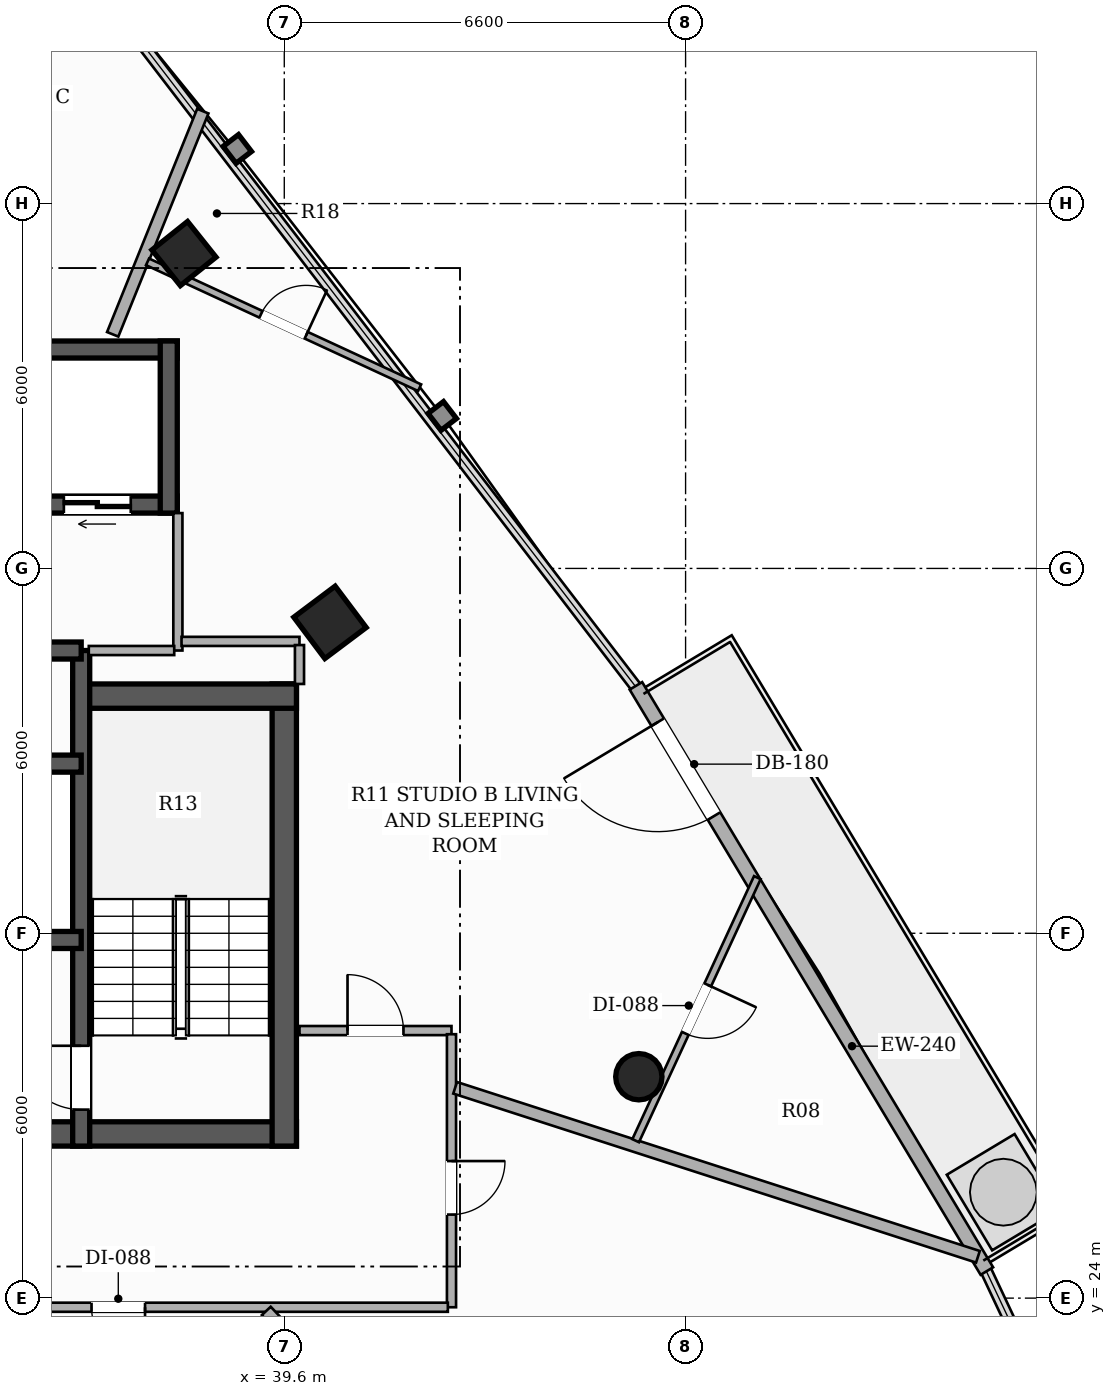
"""IFC4 building model, lengths in metres.
Left out: names, types, materials, properties, quantities, classifications, styles, units other than length and angle.
Written with IfcOpenShell. Run it as: python <this file> out.ifc"""

import sys

from ifc_helpers import new_model, si_unit, direction, frame, frame_2d, origin, origin_2d, place, context, subcontext, project, spatial, rectangle, hollow_rectangle, hollow_circle, extrude, element, fill, save


model = new_model("IFC4")
c1 = context("Model", 3, precision=1e-05, world=origin(), true_north=direction((0.0, 1.0)))
c2 = subcontext(c1, "Body", "Model", "MODEL_VIEW")
j1 = project(units=[si_unit("LENGTHUNIT", "METRE"), si_unit("PLANEANGLEUNIT", "RADIAN")], contexts=[c1])
p1 = place(None, origin())
s1 = spatial("IfcSite", under=j1, at=p1, CompositionType="ELEMENT")
p2 = place(p1, origin())
s2 = spatial("IfcBuilding", under=s1, at=p2, CompositionType="ELEMENT")
p3 = place(p2, frame((0.0, 0.0, 150.65)))
s3 = spatial("IfcBuildingStorey", under=s2, at=p3, CompositionType="ELEMENT", Elevation=150.65)
p4 = place(p3, frame((26.2, 26.7, 0.0), z_axis=(0.0, 0.0, 1.0), x_axis=(1.0, 0.0, 0.0)))
e1 = element("IfcWall", 1, at=p4, inside=s3, PredefinedType="SHEAR", context=c2, shape_type="SweptSolid", body=[
    extrude(rectangle(XDim=13.6, YDim=0.4, at=frame_2d((6.8, 0.0))), origin(), (0.0, 0.0, 1.0), 3.3),
])
p5 = place(p4, frame((4.35, 0.0, 0.0)))
e2 = element("IfcOpeningElement", 2, at=p5, cuts=e1, PredefinedType="OPENING", context=c2, shape_type="SweptSolid", body=[
    extrude(rectangle(XDim=1.05, YDim=2.15, at=frame_2d((0.525, 1.075))), frame((0.0, 0.21, 0.0), z_axis=(0.0, -1.0, 0.0), x_axis=(1.0, 0.0, 0.0)), (0.0, 0.0, 1.0), 0.42),
])
p6 = place(p4, frame((8.3, 0.0, 0.0)))
e3 = element("IfcOpeningElement", 3, at=p6, cuts=e1, PredefinedType="OPENING", context=c2, shape_type="SweptSolid", body=[
    extrude(rectangle(XDim=1.05, YDim=2.15, at=frame_2d((0.525, 1.075))), frame((0.0, 0.21, 0.0), z_axis=(0.0, -1.0, 0.0), x_axis=(1.0, 0.0, 0.0)), (0.0, 0.0, 1.0), 0.42),
])
p7 = place(p3, frame((39.6, 26.5, 0.0), z_axis=(0.0, 0.0, 1.0), x_axis=(0.0, 1.0, 0.0)))
e4 = element("IfcWall", 4, at=p7, inside=s3, PredefinedType="SHEAR", context=c2, shape_type="SweptSolid", body=[
    extrude(rectangle(XDim=7.6, YDim=0.4, at=frame_2d((3.8, 0.0))), origin(), (0.0, 0.0, 1.0), 3.3),
])
p8 = place(p3, frame((36.12, 33.9, 0.0), z_axis=(0.0, 0.0, 1.0), x_axis=(1.0, 0.0, 0.0)))
e5 = element("IfcWall", 5, at=p8, inside=s3, PredefinedType="SHEAR", context=c2, shape_type="SweptSolid", body=[
    extrude(rectangle(XDim=3.68, YDim=0.4, at=frame_2d((1.84, 0.0))), origin(), (0.0, 0.0, 1.0), 3.3),
])
p9 = place(p3, frame((36.26, 26.5, 0.0), z_axis=(0.0, 0.0, 1.0), x_axis=(0.0, 1.0, 0.0)))
e6 = element("IfcWall", 6, at=p9, inside=s3, PredefinedType="SHEAR", context=c2, shape_type="SweptSolid", body=[
    extrude(rectangle(XDim=8.15, YDim=0.28, at=frame_2d((4.075, 0.0))), origin(), (0.0, 0.0, 1.0), 3.3),
])
p10 = place(p9, frame((0.6, 0.0, 0.0)))
e7 = element("IfcOpeningElement", 7, at=p10, cuts=e6, PredefinedType="OPENING", context=c2, shape_type="SweptSolid", body=[
    extrude(rectangle(XDim=1.05, YDim=2.15, at=frame_2d((0.525, 1.075))), frame((0.0, 0.15, 0.0), z_axis=(0.0, -1.0, 0.0), x_axis=(1.0, 0.0, 0.0)), (0.0, 0.0, 1.0), 0.3),
])
p11 = place(p3, frame((36.26, 29.89, 0.0), z_axis=(0.0, 0.0, 1.0), x_axis=(-1.0, 0.0, 0.0)))
e8 = element("IfcWall", 8, at=p11, inside=s3, PredefinedType="SHEAR", context=c2, shape_type="SweptSolid", body=[
    extrude(rectangle(XDim=6.52, YDim=0.28, at=frame_2d((3.26, 0.0))), origin(), (0.0, 0.0, 1.0), 3.3),
])
p12 = place(p11, frame((4.875, 0.0, 0.0)))
e9 = element("IfcOpeningElement", 9, at=p12, cuts=e8, PredefinedType="OPENING", context=c2, shape_type="SweptSolid", body=[
    extrude(rectangle(XDim=1.1, YDim=2.2, at=frame_2d((0.55, 1.1))), frame((0.0, 0.15, 0.0), z_axis=(0.0, -1.0, 0.0), x_axis=(1.0, 0.0, 0.0)), (0.0, 0.0, 1.0), 0.3),
])
p13 = place(p11, frame((2.875, 0.0, 0.0)))
e10 = element("IfcOpeningElement", 10, at=p13, cuts=e8, PredefinedType="OPENING", context=c2, shape_type="SweptSolid", body=[
    extrude(rectangle(XDim=1.1, YDim=2.2, at=frame_2d((0.55, 1.1))), frame((0.0, 0.15, 0.0), z_axis=(0.0, -1.0, 0.0), x_axis=(1.0, 0.0, 0.0)), (0.0, 0.0, 1.0), 0.3),
])
p14 = place(p11, frame((0.6, 0.0, 0.0)))
e11 = element("IfcOpeningElement", 11, at=p14, cuts=e8, PredefinedType="OPENING", context=c2, shape_type="SweptSolid", body=[
    extrude(rectangle(XDim=1.3, YDim=2.2, at=frame_2d((0.65, 1.1))), frame((0.0, 0.15, 0.0), z_axis=(0.0, -1.0, 0.0), x_axis=(1.0, 0.0, 0.0)), (0.0, 0.0, 1.0), 0.3),
])
p15 = place(p3, frame((29.74, 32.79, 0.0), z_axis=(0.0, 0.0, 1.0), x_axis=(1.0, 0.0, 0.0)))
e12 = element("IfcWall", 12, at=p15, inside=s3, PredefinedType="SHEAR", context=c2, shape_type="SweptSolid", body=[
    extrude(rectangle(XDim=6.52, YDim=0.28, at=frame_2d((3.26, 0.0))), origin(), (0.0, 0.0, 1.0), 3.3),
])
p16 = place(p3, frame((29.74, 34.65, 0.0), z_axis=(0.0, 0.0, 1.0), x_axis=(1.0, 0.0, 0.0)))
e13 = element("IfcWall", 13, at=p16, inside=s3, PredefinedType="SHEAR", context=c2, shape_type="SweptSolid", body=[
    extrude(rectangle(XDim=6.52, YDim=0.28, at=frame_2d((3.26, 0.0))), origin(), (0.0, 0.0, 1.0), 3.3),
])
p17 = place(p16, frame((0.765, 0.0, 0.0)))
e14 = element("IfcOpeningElement", 14, at=p17, cuts=e13, PredefinedType="OPENING", context=c2, shape_type="SweptSolid", body=[
    extrude(rectangle(XDim=0.82, YDim=2.1, at=frame_2d((0.41, 1.05))), frame((0.0, 0.15, 0.0), z_axis=(0.0, -1.0, 0.0), x_axis=(1.0, 0.0, 0.0)), (0.0, 0.0, 1.0), 0.3),
])
p18 = place(p16, frame((2.84, 0.0, 0.0)))
e15 = element("IfcOpeningElement", 15, at=p18, cuts=e13, PredefinedType="OPENING", context=c2, shape_type="SweptSolid", body=[
    extrude(rectangle(XDim=0.82, YDim=2.1, at=frame_2d((0.41, 1.05))), frame((0.0, 0.15, 0.0), z_axis=(0.0, -1.0, 0.0), x_axis=(1.0, 0.0, 0.0)), (0.0, 0.0, 1.0), 0.3),
])
p19 = place(p16, frame((4.915, 0.0, 0.0)))
e16 = element("IfcOpeningElement", 16, at=p19, cuts=e13, PredefinedType="OPENING", context=c2, shape_type="SweptSolid", body=[
    extrude(rectangle(XDim=0.82, YDim=2.1, at=frame_2d((0.41, 1.05))), frame((0.0, 0.15, 0.0), z_axis=(0.0, -1.0, 0.0), x_axis=(1.0, 0.0, 0.0)), (0.0, 0.0, 1.0), 0.3),
])
p20 = place(p3, frame((37.84, 37.05, 0.0), z_axis=(0.0, 0.0, 1.0), x_axis=(-1.0, 0.0, 0.0)))
e17 = element("IfcWall", 17, at=p20, inside=s3, PredefinedType="SHEAR", context=c2, shape_type="SweptSolid", body=[
    extrude(rectangle(XDim=9.68, YDim=0.28, at=frame_2d((4.84, 0.0))), origin(), (0.0, 0.0, 1.0), 3.3),
])
p21 = place(p20, frame((7.815, 0.0, 0.0)))
e18 = element("IfcOpeningElement", 18, at=p21, cuts=e17, PredefinedType="OPENING", context=c2, shape_type="SweptSolid", body=[
    extrude(rectangle(XDim=1.1, YDim=2.2, at=frame_2d((0.55, 1.1))), frame((0.0, 0.15, 0.0), z_axis=(0.0, -1.0, 0.0), x_axis=(1.0, 0.0, 0.0)), (0.0, 0.0, 1.0), 0.3),
])
p22 = place(p20, frame((0.765, 0.0, 0.0)))
e19 = element("IfcOpeningElement", 19, at=p22, cuts=e17, PredefinedType="OPENING", context=c2, shape_type="SweptSolid", body=[
    extrude(rectangle(XDim=1.1, YDim=2.2, at=frame_2d((0.55, 1.1))), frame((0.0, 0.15, 0.0), z_axis=(0.0, -1.0, 0.0), x_axis=(1.0, 0.0, 0.0)), (0.0, 0.0, 1.0), 0.3),
])
p23 = place(p3, frame((28.16, 39.6, 0.0), z_axis=(0.0, 0.0, 1.0), x_axis=(1.0, 0.0, 0.0)))
e20 = element("IfcWall", 20, at=p23, inside=s3, PredefinedType="SHEAR", context=c2, shape_type="SweptSolid", body=[
    extrude(rectangle(XDim=9.68, YDim=0.28, at=frame_2d((4.84, 0.0))), origin(), (0.0, 0.0, 1.0), 3.3),
])
p24 = place(p3, frame((37.7, 36.91, 0.0), z_axis=(0.0, 0.0, 1.0), x_axis=(0.0, 1.0, 0.0)))
e21 = element("IfcWall", 21, at=p24, inside=s3, PredefinedType="SHEAR", context=c2, shape_type="SweptSolid", body=[
    extrude(rectangle(XDim=2.83, YDim=0.28, at=frame_2d((1.415, 0.0))), origin(), (0.0, 0.0, 1.0), 3.3),
])
p25 = place(p3, frame((45.431, 27.641, 0.0), z_axis=(0.0, 0.0, 1.0), x_axis=(1.0, 0.0, 0.0)))
e22 = element("IfcColumn", 22, at=p25, inside=s3, PredefinedType="COLUMN", context=c2, shape_type="SweptSolid", body=[
    extrude(hollow_circle(Radius=0.381, WallThickness=0.022, at=origin_2d()), origin(), (0.0, 0.0, 1.0), 3.3),
])
p26 = place(p3, frame((40.352, 35.113, 0.0), z_axis=(0.0, 0.0, 1.0), x_axis=(-0.600420225326, 0.799684658487, 0.0)))
e23 = element("IfcColumn", 23, at=p26, inside=s3, PredefinedType="COLUMN", context=c2, shape_type="SweptSolid", body=[
    extrude(hollow_rectangle(XDim=0.85, YDim=0.85, WallThickness=0.028, at=origin_2d()), origin(), (0.0, 0.0, 1.0), 3.3),
])
p27 = place(p3, frame((37.95, 41.178, 0.0), z_axis=(0.0, 0.0, 1.0), x_axis=(-0.623879596709, 0.781520472419, 0.0)))
e24 = element("IfcColumn", 24, at=p27, inside=s3, PredefinedType="COLUMN", context=c2, shape_type="SweptSolid", body=[
    extrude(hollow_rectangle(XDim=0.75, YDim=0.75, WallThickness=0.025, at=origin_2d()), origin(), (0.0, 0.0, 1.0), 3.3),
])
p28 = place(p3, frame((51.155, 24.445, 0.0), z_axis=(0.0, 0.0, 1.0), x_axis=(-0.514335781973, 0.857588889493, 0.0)))
e25 = element("IfcWall", 25, at=p28, inside=s3, PredefinedType="SOLIDWALL", context=c2, shape_type="SweptSolid", body=[
    extrude(rectangle(XDim=11.222, YDim=0.24, at=frame_2d((5.611, 0.0))), origin(), (0.0, 0.0, 1.0), 2.624),
])
p29 = place(p28, frame((8.725, 0.0, 0.0)))
e26 = element("IfcOpeningElement", 26, at=p29, cuts=e25, PredefinedType="OPENING", context=c2, shape_type="SweptSolid", body=[
    extrude(rectangle(XDim=1.8, YDim=2.2, at=frame_2d((0.9, 1.1))), frame((0.0, 0.13, 0.0), z_axis=(0.0, -1.0, 0.0), x_axis=(1.0, 0.0, 0.0)), (0.0, 0.0, 1.0), 0.26),
])
p30 = place(p3, frame((37.85, 34.65, 0.0), z_axis=(0.0, 0.0, 1.0), x_axis=(0.0, 1.0, 0.0)))
e27 = element("IfcWall", 27, at=p30, inside=s3, PredefinedType="PARTITIONING", context=c2, shape_type="SweptSolid", body=[
    extrude(rectangle(XDim=2.26, YDim=0.15, at=frame_2d((1.13, 0.0))), origin(), (0.0, 0.0, 1.0), 3.06),
])
p31 = place(p3, frame((36.385, 34.65, 0.0), z_axis=(0.0, 0.0, 1.0), x_axis=(1.0, 0.0, 0.0)))
e28 = element("IfcWall", 28, at=p31, inside=s3, PredefinedType="PARTITIONING", context=c2, shape_type="SweptSolid", body=[
    extrude(rectangle(XDim=1.405, YDim=0.15, at=frame_2d((0.703, 0.0))), origin(), (0.0, 0.0, 1.0), 2.425),
])
p32 = place(p3, frame((39.85, 28.4, 0.0), z_axis=(0.0, 0.0, 1.0), x_axis=(1.0, 0.0, 0.0)))
e29 = element("IfcWall", 29, at=p32, inside=s3, PredefinedType="PARTITIONING", context=c2, shape_type="SweptSolid", body=[
    extrude(rectangle(XDim=2.5, YDim=0.15, at=frame_2d((1.25, 0.0))), origin(), (0.0, 0.0, 1.0), 2.721),
])
p33 = place(p32, frame((0.79, 0.0, 0.0)))
e30 = element("IfcOpeningElement", 30, at=p33, cuts=e29, PredefinedType="OPENING", context=c2, shape_type="SweptSolid", body=[
    extrude(rectangle(XDim=0.92, YDim=2.15, at=frame_2d((0.46, 1.075))), frame((0.0, 0.085, 0.0), z_axis=(0.0, -1.0, 0.0), x_axis=(1.0, 0.0, 0.0)), (0.0, 0.0, 1.0), 0.17),
])
p34 = place(p3, frame((42.35, 28.34, 0.0), z_axis=(0.0, 0.0, 1.0), x_axis=(0.0, -1.0, 0.0)))
e31 = element("IfcWall", 31, at=p34, inside=s3, PredefinedType="PARTITIONING", context=c2, shape_type="SweptSolid", body=[
    extrude(rectangle(XDim=4.49, YDim=0.15, at=frame_2d((2.245, 0.0))), origin(), (0.0, 0.0, 1.0), 2.721),
])
p35 = place(p34, frame((2.086, 0.0, 0.0)))
e32 = element("IfcOpeningElement", 32, at=p35, cuts=e31, PredefinedType="OPENING", context=c2, shape_type="SweptSolid", body=[
    extrude(rectangle(XDim=0.88, YDim=2.1, at=frame_2d((0.44, 1.05))), frame((0.0, 0.085, 0.0), z_axis=(0.0, -1.0, 0.0), x_axis=(1.0, 0.0, 0.0)), (0.0, 0.0, 1.0), 0.17),
])
p36 = place(p3, frame((42.29, 23.85, 0.0), z_axis=(0.0, 0.0, 1.0), x_axis=(-1.0, 0.0, 0.0)))
e33 = element("IfcWall", 33, at=p36, inside=s3, PredefinedType="PARTITIONING", context=c2, shape_type="SweptSolid", body=[
    extrude(rectangle(XDim=8.179, YDim=0.15, at=frame_2d((4.089, 0.0))), origin(), (0.0, 0.0, 1.0), 2.492),
])
p37 = place(p36, frame((4.98, 0.0, 0.0)))
e34 = element("IfcOpeningElement", 34, at=p37, cuts=e33, PredefinedType="OPENING", context=c2, shape_type="SweptSolid", body=[
    extrude(rectangle(XDim=0.88, YDim=2.1, at=frame_2d((0.44, 1.05))), frame((0.0, 0.085, 0.0), z_axis=(0.0, -1.0, 0.0), x_axis=(1.0, 0.0, 0.0)), (0.0, 0.0, 1.0), 0.17),
])
p38 = place(p3, frame((37.91, 34.8, 0.0), z_axis=(0.0, 0.0, 1.0), x_axis=(1.0, 0.0, 0.0)))
e35 = element("IfcWall", 35, at=p38, inside=s3, PredefinedType="PARTITIONING", context=c2, shape_type="SweptSolid", body=[
    extrude(rectangle(XDim=1.94, YDim=0.15, at=frame_2d((0.97, 0.0))), origin(), (0.0, 0.0, 1.0), 2.721),
])
p39 = place(p3, frame((39.85, 34.74, 0.0), z_axis=(0.0, 0.0, 1.0), x_axis=(0.0, -1.0, 0.0)))
e36 = element("IfcWall", 36, at=p39, inside=s3, PredefinedType="PARTITIONING", context=c2, shape_type="SweptSolid", body=[
    extrude(rectangle(XDim=0.64, YDim=0.15, at=frame_2d((0.32, 0.0))), origin(), (0.0, 0.0, 1.0), 2.721),
])
p40 = place(p3, frame((34.147, 23.79, 0.0), z_axis=(0.0, 0.0, 1.0), x_axis=(0.521429001816, -0.853294671298, 0.0)))
e37 = element("IfcWall", 37, at=p40, inside=s3, PredefinedType="PARTITIONING", context=c2, shape_type="SweptSolid", body=[
    extrude(rectangle(XDim=7.991, YDim=0.15, at=frame_2d((3.996, 0.0))), origin(), (0.0, 0.0, 1.0), 2.721),
])
p41 = place(p3, frame((39.304, 23.79, 0.0), z_axis=(0.0, 0.0, 1.0), x_axis=(0.684750154022, -0.72877789934, 0.0)))
e38 = element("IfcWall", 38, at=p41, inside=s3, PredefinedType="PARTITIONING", context=c2, shape_type="SweptSolid", body=[
    extrude(rectangle(XDim=24.781, YDim=0.2, at=frame_2d((12.391, 0.0))), origin(), (0.0, 0.0, 1.0), 2.413),
])
p42 = place(p3, frame((42.41, 27.459, 0.0), z_axis=(0.0, 0.0, 1.0), x_axis=(0.951531988225, -0.307549793343, 0.0)))
e39 = element("IfcWall", 39, at=p42, inside=s3, PredefinedType="PARTITIONING", context=c2, shape_type="SweptSolid", body=[
    extrude(rectangle(XDim=9.036, YDim=0.2, at=frame_2d((4.518, 0.0))), origin(), (0.0, 0.0, 1.0), 2.413),
])
p43 = place(p3, frame((36.778, 39.85, 0.0), z_axis=(0.0, 0.0, 1.0), x_axis=(0.374430412004, 0.927255017008, 0.0)))
e40 = element("IfcWall", 40, at=p43, inside=s3, PredefinedType="PARTITIONING", context=c2, shape_type="SweptSolid", body=[
    extrude(rectangle(XDim=3.958, YDim=0.2, at=frame_2d((1.979, 0.0))), origin(), (0.0, 0.0, 1.0), 2.413),
])
p44 = place(p3, frame((37.351, 41.042, 0.0), z_axis=(0.0, 0.0, 1.0), x_axis=(0.907592371503, -0.419852458834, 0.0)))
e41 = element("IfcWall", 41, at=p44, inside=s3, PredefinedType="PARTITIONING", context=c2, shape_type="SweptSolid", body=[
    extrude(rectangle(XDim=4.93, YDim=0.12, at=frame_2d((2.465, 0.0))), origin(), (0.0, 0.0, 1.0), 2.413),
])
p45 = place(p44, frame((2.055, 0.0, 0.0)))
e42 = element("IfcOpeningElement", 42, at=p45, cuts=e41, PredefinedType="OPENING", context=c2, shape_type="SweptSolid", body=[
    extrude(rectangle(XDim=0.82, YDim=2.1, at=frame_2d((0.41, 1.05))), frame((0.0, 0.07, 0.0), z_axis=(0.0, -1.0, 0.0), x_axis=(1.0, 0.0, 0.0)), (0.0, 0.0, 1.0), 0.14),
])
p46 = place(p3, frame((47.38, 30.915, 0.0), z_axis=(0.0, 0.0, 1.0), x_axis=(-0.419818119852, -0.907608255936, 0.0)))
e43 = element("IfcWall", 43, at=p46, inside=s3, PredefinedType="PARTITIONING", context=c2, shape_type="SweptSolid", body=[
    extrude(rectangle(XDim=4.766, YDim=0.12, at=frame_2d((2.383, 0.0))), origin(), (0.0, 0.0, 1.0), 2.413),
])
p47 = place(p46, frame((1.943, 0.0, 0.0)))
e44 = element("IfcOpeningElement", 44, at=p47, cuts=e43, PredefinedType="OPENING", context=c2, shape_type="SweptSolid", body=[
    extrude(rectangle(XDim=0.88, YDim=2.1, at=frame_2d((0.44, 1.05))), frame((0.0, 0.07, 0.0), z_axis=(0.0, -1.0, 0.0), x_axis=(1.0, 0.0, 0.0)), (0.0, 0.0, 1.0), 0.14),
])
p48 = place(p29, origin())
e45 = element("IfcDoor", 45, at=p48, inside=s3, OperationType="SINGLE_SWING_RIGHT", PredefinedType="DOOR", context=c2, shape_type="SweptSolid", body=[
    extrude(rectangle(XDim=1.8, YDim=2.2, at=frame_2d((0.9, 1.1))), frame((0.0, 0.025, 0.0), z_axis=(0.0, -1.0, 0.0), x_axis=(1.0, 0.0, 0.0)), (0.0, 0.0, 1.0), 0.05),
])
fill(e26, e45)
p49 = place(p10, origin())
e46 = element("IfcDoor", 46, at=p49, inside=s3, OperationType="SINGLE_SWING_RIGHT", PredefinedType="DOOR", context=c2, shape_type="SweptSolid", body=[
    extrude(rectangle(XDim=1.05, YDim=2.15, at=frame_2d((0.525, 1.075))), frame((0.0, 0.025, 0.0), z_axis=(0.0, -1.0, 0.0), x_axis=(1.0, 0.0, 0.0)), (0.0, 0.0, 1.0), 0.05),
])
fill(e7, e46)
p50 = place(p22, origin())
e47 = element("IfcDoor", 47, at=p50, inside=s3, OperationType="DOUBLE_DOOR_SLIDING", PredefinedType="DOOR", context=c2, shape_type="SweptSolid", body=[
    extrude(rectangle(XDim=1.1, YDim=2.2, at=frame_2d((0.55, 1.1))), frame((0.0, 0.025, 0.0), z_axis=(0.0, -1.0, 0.0), x_axis=(1.0, 0.0, 0.0)), (0.0, 0.0, 1.0), 0.05),
])
fill(e19, e47)
p51 = place(p37, origin())
e48 = element("IfcDoor", 48, at=p51, inside=s3, OperationType="SINGLE_SWING_LEFT", PredefinedType="DOOR", context=c2, shape_type="SweptSolid", body=[
    extrude(rectangle(XDim=0.88, YDim=2.1, at=frame_2d((0.44, 1.05))), frame((0.0, 0.025, 0.0), z_axis=(0.0, -1.0, 0.0), x_axis=(1.0, 0.0, 0.0)), (0.0, 0.0, 1.0), 0.05),
])
fill(e34, e48)
p52 = place(p35, origin())
e49 = element("IfcDoor", 49, at=p52, inside=s3, OperationType="SINGLE_SWING_LEFT", PredefinedType="DOOR", context=c2, shape_type="SweptSolid", body=[
    extrude(rectangle(XDim=0.88, YDim=2.1, at=frame_2d((0.44, 1.05))), frame((0.0, 0.025, 0.0), z_axis=(0.0, -1.0, 0.0), x_axis=(1.0, 0.0, 0.0)), (0.0, 0.0, 1.0), 0.05),
])
fill(e32, e49)
p53 = place(p33, origin())
e50 = element("IfcDoor", 50, at=p53, inside=s3, OperationType="SINGLE_SWING_LEFT", PredefinedType="DOOR", context=c2, shape_type="SweptSolid", body=[
    extrude(rectangle(XDim=0.92, YDim=2.15, at=frame_2d((0.46, 1.075))), frame((0.0, 0.025, 0.0), z_axis=(0.0, -1.0, 0.0), x_axis=(1.0, 0.0, 0.0)), (0.0, 0.0, 1.0), 0.05),
])
fill(e30, e50)
p54 = place(p45, origin())
e51 = element("IfcDoor", 51, at=p54, inside=s3, OperationType="SINGLE_SWING_RIGHT", PredefinedType="DOOR", context=c2, shape_type="SweptSolid", body=[
    extrude(rectangle(XDim=0.82, YDim=2.1, at=frame_2d((0.41, 1.05))), frame((0.0, 0.025, 0.0), z_axis=(0.0, -1.0, 0.0), x_axis=(1.0, 0.0, 0.0)), (0.0, 0.0, 1.0), 0.05),
])
fill(e42, e51)
p55 = place(p47, origin())
e52 = element("IfcDoor", 52, at=p55, inside=s3, OperationType="SINGLE_SWING_LEFT", PredefinedType="DOOR", context=c2, shape_type="SweptSolid", body=[
    extrude(rectangle(XDim=0.88, YDim=2.1, at=frame_2d((0.44, 1.05))), frame((0.0, 0.025, 0.0), z_axis=(0.0, -1.0, 0.0), x_axis=(1.0, 0.0, 0.0)), (0.0, 0.0, 1.0), 0.05),
])
fill(e44, e52)
save(model, sys.argv[1])
